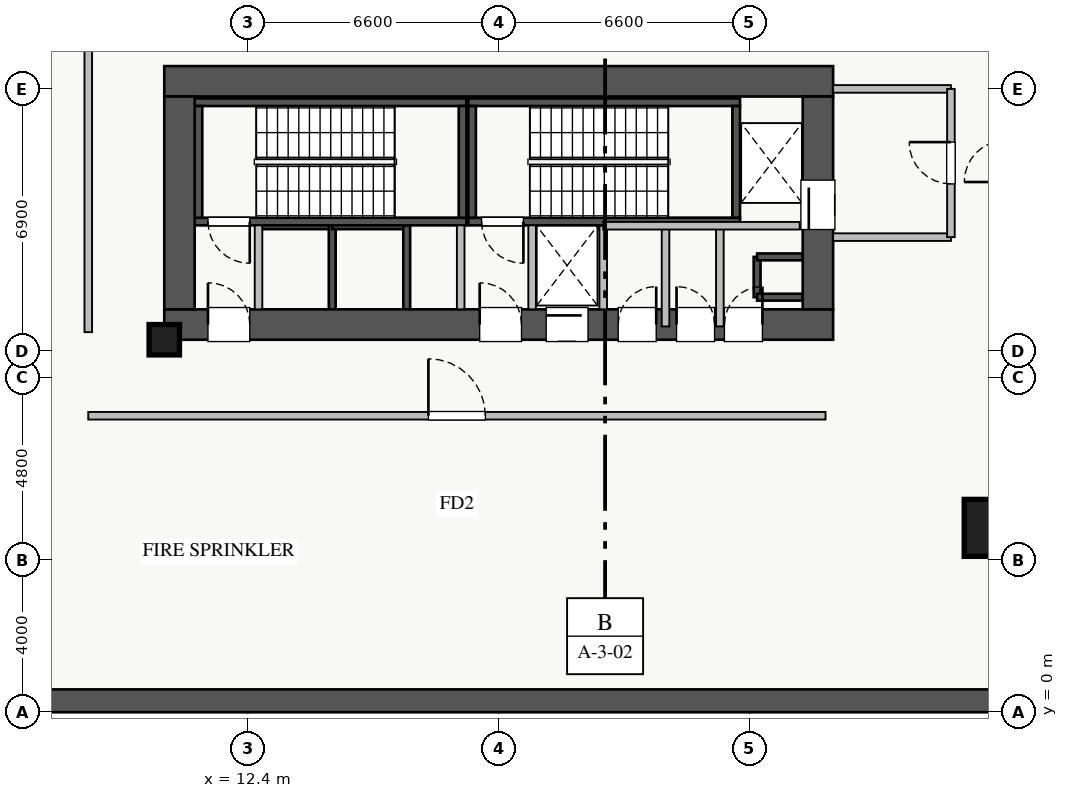
"""IFC4 building model, lengths in metres.
Left out: names, types, materials, properties, quantities, classifications, styles, units other than length and angle.
Written with IfcOpenShell. Run it as: python <this file> out.ifc"""

import sys

from ifc_helpers import new_model, si_unit, direction, frame, frame_2d, origin, origin_2d, place, context, subcontext, project, spatial, rectangle, extrude, source, transform, mapped, element, fill, save


model = new_model("IFC4")
c1 = context("Model", 3, precision=1e-05, world=origin(), true_north=direction((0.0, 1.0)))
c2 = subcontext(c1, "Body", "Model", "MODEL_VIEW")
j1 = project(units=[si_unit("LENGTHUNIT", "METRE"), si_unit("PLANEANGLEUNIT", "RADIAN")], contexts=[c1])
p1 = place(None, origin())
s1 = spatial("IfcSite", under=j1, at=p1, CompositionType="ELEMENT")
p2 = place(p1, origin())
s2 = spatial("IfcBuilding", under=s1, at=p2, CompositionType="ELEMENT")
p3 = place(p2, frame((0.0, 0.0, -9.6)))
s3 = spatial("IfcBuildingStorey", under=s2, at=p3, CompositionType="ELEMENT", Elevation=-9.6)
p4 = place(p3, frame((12.68, 12.8, 0.0), z_axis=(0.0, 0.0, 1.0), x_axis=(1.0, 0.0, 0.0)))
e1 = element("IfcWall", 1, at=p4, inside=s3, PredefinedType="SHEAR", context=c2, shape_type="SweptSolid", body=[
    extrude(rectangle(XDim=1.94, YDim=0.18, at=frame_2d((0.97, 0.0))), origin(), (0.0, 0.0, 1.0), 4.58),
])
p5 = place(p3, frame((14.62, 10.6, 0.0), z_axis=(0.0, 0.0, 1.0), x_axis=(0.0, 1.0, 0.0)))
e2 = element("IfcWall", 2, at=p5, inside=s3, PredefinedType="SHEAR", context=c2, shape_type="SweptSolid", body=[
    extrude(rectangle(XDim=2.2, YDim=0.18, at=frame_2d((1.1, 0.0))), origin(), (0.0, 0.0, 1.0), 4.58),
])
p6 = place(p3, frame((25.8, 10.92, 0.0), z_axis=(0.0, 0.0, 1.0), x_axis=(0.0, 1.0, 0.0)))
e3 = element("IfcWall", 3, at=p6, inside=s3, PredefinedType="SHEAR", context=c2, shape_type="SweptSolid", body=[
    extrude(rectangle(XDim=1.06, YDim=0.18, at=frame_2d((0.53, 0.0))), origin(), (0.0, 0.0, 1.0), 4.58),
])
for number, where, z_axis, x_axis in (
    (4, (25.8, 11.98, 0.0), (0.0, 0.0, 1.0), (1.0, 0.0, 0.0)),
    (5, (25.8, 10.92, 0.0), (0.0, 0.0, 1.0), (1.0, 0.0, 0.0)),
):
    element("IfcWall", number, at=place(p3, frame(where, z_axis=z_axis, x_axis=x_axis)), inside=s3, PredefinedType="SHEAR", context=c2, shape_type="SweptSolid", body=[
        extrude(rectangle(XDim=1.2, YDim=0.18, at=frame_2d((0.6, 0.0))), origin(), (0.0, 0.0, 1.0), 4.58),
    ])
p7 = place(p3, frame((14.62, 12.8, 0.0), z_axis=(0.0, 0.0, 1.0), x_axis=(1.0, 0.0, 0.0)))
e6 = element("IfcWall", 6, at=p7, inside=s3, PredefinedType="SHEAR", context=c2, shape_type="SweptSolid", body=[
    extrude(rectangle(XDim=1.96, YDim=0.18, at=frame_2d((0.98, 0.0))), origin(), (0.0, 0.0, 1.0), 4.58),
])
p8 = place(p3, frame((16.58, 10.6, 0.0), z_axis=(0.0, 0.0, 1.0), x_axis=(0.0, 1.0, 0.0)))
e7 = element("IfcWall", 7, at=p8, inside=s3, PredefinedType="SHEAR", context=c2, shape_type="SweptSolid", body=[
    extrude(rectangle(XDim=2.2, YDim=0.18, at=frame_2d((1.1, 0.0))), origin(), (0.0, 0.0, 1.0), 4.58),
])
p9 = place(p3, frame((19.88, 12.8, 0.0), z_axis=(0.0, 0.0, 1.0), x_axis=(1.0, 0.0, 0.0)))
e8 = element("IfcWall", 8, at=p9, inside=s3, PredefinedType="SHEAR", context=c2, shape_type="SweptSolid", body=[
    extrude(rectangle(XDim=1.87, YDim=0.18, at=frame_2d((0.935, 0.0))), origin(), (0.0, 0.0, 1.0), 4.58),
])
p10 = place(p3, frame((11.0, 12.91, 0.0), z_axis=(0.0, 0.0, 1.0), x_axis=(1.0, 0.0, 0.0)))
e9 = element("IfcWall", 9, at=p10, inside=s3, PredefinedType="SHEAR", context=c2, shape_type="SweptSolid", body=[
    extrude(rectangle(XDim=7.15, YDim=0.2, at=frame_2d((3.575, 0.0))), origin(), (0.0, 0.0, 1.0), 4.8),
])
p11 = place(p10, frame((0.35, 0.0, 0.0)))
e10 = element("IfcOpeningElement", 10, at=p11, cuts=e9, PredefinedType="OPENING", context=c2, shape_type="SweptSolid", body=[
    extrude(rectangle(XDim=1.1, YDim=2.05, at=frame_2d((0.55, 1.025))), frame((0.0, 0.11, 0.0), z_axis=(0.0, -1.0, 0.0), x_axis=(1.0, 0.0, 0.0)), (0.0, 0.0, 1.0), 0.22),
])
p12 = place(p3, frame((11.0, 16.05, 0.0), z_axis=(0.0, 0.0, 1.0), x_axis=(1.0, 0.0, 0.0)))
e11 = element("IfcWall", 11, at=p12, inside=s3, PredefinedType="SHEAR", context=c2, shape_type="SweptSolid", body=[
    extrude(rectangle(XDim=7.15, YDim=0.2, at=frame_2d((3.575, 0.0))), origin(), (0.0, 0.0, 1.0), 4.8),
])
for number, where, z_axis, x_axis in (
    (12, (11.1, 13.01, 0.0), (0.0, 0.0, 1.0), (0.0, 1.0, 0.0)),
    (13, (18.05, 13.01, 0.0), (0.0, 0.0, 1.0), (0.0, 1.0, 0.0)),
):
    element("IfcWall", number, at=place(p3, frame(where, z_axis=z_axis, x_axis=x_axis)), inside=s3, PredefinedType="SHEAR", context=c2, shape_type="SweptSolid", body=[
        extrude(rectangle(XDim=2.94, YDim=0.2, at=frame_2d((1.47, 0.0))), origin(), (0.0, 0.0, 1.0), 4.8),
    ])
p13 = place(p3, frame((18.2, 12.91, 0.0), z_axis=(0.0, 0.0, 1.0), x_axis=(1.0, 0.0, 0.0)))
e14 = element("IfcWall", 14, at=p13, inside=s3, PredefinedType="SHEAR", context=c2, shape_type="SweptSolid", body=[
    extrude(rectangle(XDim=7.15, YDim=0.2, at=frame_2d((3.575, 0.0))), origin(), (0.0, 0.0, 1.0), 4.8),
])
p14 = place(p13, frame((0.35, 0.0, 0.0)))
e15 = element("IfcOpeningElement", 15, at=p14, cuts=e14, PredefinedType="OPENING", context=c2, shape_type="SweptSolid", body=[
    extrude(rectangle(XDim=1.1, YDim=2.05, at=frame_2d((0.55, 1.025))), frame((0.0, 0.11, 0.0), z_axis=(0.0, -1.0, 0.0), x_axis=(1.0, 0.0, 0.0)), (0.0, 0.0, 1.0), 0.22),
])
p15 = place(p3, frame((18.2, 16.05, 0.0), z_axis=(0.0, 0.0, 1.0), x_axis=(1.0, 0.0, 0.0)))
e16 = element("IfcWall", 16, at=p15, inside=s3, PredefinedType="SHEAR", context=c2, shape_type="SweptSolid", body=[
    extrude(rectangle(XDim=7.15, YDim=0.2, at=frame_2d((3.575, 0.0))), origin(), (0.0, 0.0, 1.0), 4.8),
])
for number, where, z_axis, x_axis in (
    (17, (18.3, 13.01, 0.0), (0.0, 0.0, 1.0), (0.0, 1.0, 0.0)),
    (18, (25.25, 13.01, 0.0), (0.0, 0.0, 1.0), (0.0, 1.0, 0.0)),
):
    element("IfcWall", number, at=place(p3, frame(where, z_axis=z_axis, x_axis=x_axis)), inside=s3, PredefinedType="SHEAR", context=c2, shape_type="SweptSolid", body=[
        extrude(rectangle(XDim=2.94, YDim=0.2, at=frame_2d((1.47, 0.0))), origin(), (0.0, 0.0, 1.0), 4.8),
    ])
p16 = place(p3, frame((0.0, 0.3, 0.0), z_axis=(0.0, 0.0, 1.0), x_axis=(1.0, 0.0, 0.0)))
e19 = element("IfcWall", 19, at=p16, inside=s3, PredefinedType="SOLIDWALL", context=c2, shape_type="SweptSolid", body=[
    extrude(rectangle(XDim=74.0, YDim=0.6, at=frame_2d((37.0, 0.0))), origin(), (0.0, 0.0, 1.0), 4.8),
])
p17 = place(p3, frame((10.2, 10.2, 0.0), z_axis=(0.0, 0.0, 1.0), x_axis=(1.0, 0.0, 0.0)))
e20 = element("IfcWall", 20, at=p17, inside=s3, PredefinedType="SHEAR", context=c2, shape_type="SweptSolid", body=[
    extrude(rectangle(XDim=17.6, YDim=0.8, at=frame_2d((8.8, 0.0))), origin(), (0.0, 0.0, 1.0), 4.8),
])
p18 = place(p17, frame((1.15, 0.0, 0.0)))
e21 = element("IfcOpeningElement", 21, at=p18, cuts=e20, PredefinedType="OPENING", context=c2, shape_type="SweptSolid", body=[
    extrude(rectangle(XDim=1.1, YDim=2.05, at=frame_2d((0.55, 1.025))), frame((0.0, 0.41, 0.0), z_axis=(0.0, -1.0, 0.0), x_axis=(1.0, 0.0, 0.0)), (0.0, 0.0, 1.0), 0.82),
])
p19 = place(p17, frame((8.3, 0.0, 0.0)))
e22 = element("IfcOpeningElement", 22, at=p19, cuts=e20, PredefinedType="OPENING", context=c2, shape_type="SweptSolid", body=[
    extrude(rectangle(XDim=1.1, YDim=2.05, at=frame_2d((0.55, 1.025))), frame((0.0, 0.41, 0.0), z_axis=(0.0, -1.0, 0.0), x_axis=(1.0, 0.0, 0.0)), (0.0, 0.0, 1.0), 0.82),
])
p20 = place(p17, frame((10.05, 0.0, 0.0)))
e23 = element("IfcOpeningElement", 23, at=p20, cuts=e20, PredefinedType="OPENING", context=c2, shape_type="SweptSolid", body=[
    extrude(rectangle(XDim=1.1, YDim=2.05, at=frame_2d((0.55, 1.025))), frame((0.0, 0.41, 0.0), z_axis=(0.0, -1.0, 0.0), x_axis=(1.0, 0.0, 0.0)), (0.0, 0.0, 1.0), 0.82),
])
p21 = place(p17, frame((14.74, 0.0, 0.0)))
e24 = element("IfcOpeningElement", 24, at=p21, cuts=e20, PredefinedType="OPENING", context=c2, shape_type="SweptSolid", body=[
    extrude(rectangle(XDim=1.0, YDim=2.05, at=frame_2d((0.5, 1.025))), frame((0.0, 0.41, 0.0), z_axis=(0.0, -1.0, 0.0), x_axis=(1.0, 0.0, 0.0)), (0.0, 0.0, 1.0), 0.82),
])
p22 = place(p17, frame((11.945, 0.0, 0.0)))
e25 = element("IfcOpeningElement", 25, at=p22, cuts=e20, PredefinedType="OPENING", context=c2, shape_type="SweptSolid", body=[
    extrude(rectangle(XDim=1.0, YDim=2.05, at=frame_2d((0.5, 1.025))), frame((0.0, 0.41, 0.0), z_axis=(0.0, -1.0, 0.0), x_axis=(1.0, 0.0, 0.0)), (0.0, 0.0, 1.0), 0.82),
])
p23 = place(p17, frame((13.48, 0.0, 0.0)))
e26 = element("IfcOpeningElement", 26, at=p23, cuts=e20, PredefinedType="OPENING", context=c2, shape_type="SweptSolid", body=[
    extrude(rectangle(XDim=1.0, YDim=2.05, at=frame_2d((0.5, 1.025))), frame((0.0, 0.41, 0.0), z_axis=(0.0, -1.0, 0.0), x_axis=(1.0, 0.0, 0.0)), (0.0, 0.0, 1.0), 0.82),
])
p24 = place(p3, frame((10.2, 16.6, 0.0), z_axis=(0.0, 0.0, 1.0), x_axis=(1.0, 0.0, 0.0)))
e27 = element("IfcWall", 27, at=p24, inside=s3, PredefinedType="SHEAR", context=c2, shape_type="SweptSolid", body=[
    extrude(rectangle(XDim=17.6, YDim=0.8, at=frame_2d((8.8, 0.0))), origin(), (0.0, 0.0, 1.0), 4.8),
])
p25 = place(p3, frame((10.6, 10.6, 0.0), z_axis=(0.0, 0.0, 1.0), x_axis=(0.0, 1.0, 0.0)))
e28 = element("IfcWall", 28, at=p25, inside=s3, PredefinedType="SHEAR", context=c2, shape_type="SweptSolid", body=[
    extrude(rectangle(XDim=5.6, YDim=0.8, at=frame_2d((2.8, 0.0))), origin(), (0.0, 0.0, 1.0), 4.8),
])
p26 = place(p3, frame((27.4, 10.6, 0.0), z_axis=(0.0, 0.0, 1.0), x_axis=(0.0, 1.0, 0.0)))
e29 = element("IfcWall", 29, at=p26, inside=s3, PredefinedType="SHEAR", context=c2, shape_type="SweptSolid", body=[
    extrude(rectangle(XDim=5.6, YDim=0.8, at=frame_2d((2.8, 0.0))), origin(), (0.0, 0.0, 1.0), 4.8),
])
p27 = place(p26, frame((2.1, 0.0, 0.0)))
e30 = element("IfcOpeningElement", 30, at=p27, cuts=e29, PredefinedType="OPENING", context=c2, shape_type="SweptSolid", body=[
    extrude(rectangle(XDim=1.3, YDim=2.05, at=frame_2d((0.65, 1.025))), frame((0.0, 0.41, 0.0), z_axis=(0.0, -1.0, 0.0), x_axis=(1.0, 0.0, 0.0)), (0.0, 0.0, 1.0), 0.82),
])
m1 = source(origin(), c2, "Body", "SweptSolid", [
    extrude(rectangle(XDim=1.5, YDim=1.5, at=origin_2d()), origin(), (0.0, 0.0, 1.0), 4.8),
])
p28 = place(p3, frame((32.0, 4.85, 0.0), z_axis=(0.0, 0.0, 1.0), x_axis=(1.0, 0.0, 0.0)))
e31 = element("IfcColumn", 31, at=p28, inside=s3, PredefinedType="COLUMN", context=c2, shape_type="MappedRepresentation", body=[
    mapped(m1, transform((0.0, 0.0, 0.0), x_axis=(1.0, 0.0, 0.0), y_axis=(0.0, 1.0, 0.0), z_axis=(0.0, 0.0, 1.0), scale=1.0)),
])
m2 = source(origin(), c2, "Body", "SweptSolid", [
    extrude(rectangle(XDim=0.8, YDim=0.8, at=origin_2d()), origin(), (0.0, 0.0, 1.0), 4.8),
])
p29 = place(p3, frame((10.2, 9.8, 0.0), z_axis=(0.0, 0.0, 1.0), x_axis=(1.0, 0.0, 0.0)))
e32 = element("IfcColumn", 32, at=p29, inside=s3, PredefinedType="PILASTER", context=c2, shape_type="MappedRepresentation", body=[
    mapped(m2, transform((0.0, 0.0, 0.0), x_axis=(1.0, 0.0, 0.0), y_axis=(0.0, 1.0, 0.0), z_axis=(0.0, 0.0, 1.0), scale=1.0)),
])
p30 = place(p3, frame((27.8, 16.4, 0.0), z_axis=(0.0, 0.0, 1.0), x_axis=(1.0, 0.0, 0.0)))
e33 = element("IfcWall", 33, at=p30, inside=s3, PredefinedType="PARTITIONING", context=c2, shape_type="SweptSolid", body=[
    extrude(rectangle(XDim=3.1, YDim=0.2, at=frame_2d((1.55, 0.0))), origin(), (0.0, 0.0, 1.0), 3.875),
])
p31 = place(p3, frame((27.8, 12.5, 0.0), z_axis=(0.0, 0.0, 1.0), x_axis=(1.0, 0.0, 0.0)))
e34 = element("IfcWall", 34, at=p31, inside=s3, PredefinedType="PARTITIONING", context=c2, shape_type="SweptSolid", body=[
    extrude(rectangle(XDim=3.1, YDim=0.2, at=frame_2d((1.55, 0.0))), origin(), (0.0, 0.0, 1.0), 3.575),
])
p32 = place(p3, frame((30.9, 12.5, 0.0), z_axis=(0.0, 0.0, 1.0), x_axis=(0.0, 1.0, 0.0)))
e35 = element("IfcWall", 35, at=p32, inside=s3, PredefinedType="PARTITIONING", context=c2, shape_type="SweptSolid", body=[
    extrude(rectangle(XDim=3.9, YDim=0.2, at=frame_2d((1.95, 0.0))), origin(), (0.0, 0.0, 1.0), 4.58),
])
p33 = place(p32, frame((1.4, 0.0, 0.0)))
e36 = element("IfcOpeningElement", 36, at=p33, cuts=e35, PredefinedType="OPENING", context=c2, shape_type="SweptSolid", body=[
    extrude(rectangle(XDim=1.1, YDim=2.05, at=frame_2d((0.55, 1.025))), frame((0.0, 0.11, 0.0), z_axis=(0.0, -1.0, 0.0), x_axis=(1.0, 0.0, 0.0)), (0.0, 0.0, 1.0), 0.22),
])
for number, where, z_axis, x_axis in (
    (37, (12.68, 10.6, 0.0), (0.0, 0.0, 1.0), (0.0, 1.0, 0.0)),
    (38, (18.0, 10.6, 0.0), (0.0, 0.0, 1.0), (0.0, 1.0, 0.0)),
    (39, (19.88, 10.6, 0.0), (0.0, 0.0, 1.0), (0.0, 1.0, 0.0)),
):
    element("IfcWall", number, at=place(p3, frame(where, z_axis=z_axis, x_axis=x_axis)), inside=s3, PredefinedType="PARTITIONING", context=c2, shape_type="SweptSolid", body=[
        extrude(rectangle(XDim=2.21, YDim=0.2, at=frame_2d((1.105, 0.0))), origin(), (0.0, 0.0, 1.0), 4.58),
    ])
p34 = place(p3, frame((24.82, 10.15, 0.0), z_axis=(0.0, 0.0, 1.0), x_axis=(0.0, 1.0, 0.0)))
e40 = element("IfcWall", 40, at=p34, inside=s3, PredefinedType="PARTITIONING", context=c2, shape_type="SweptSolid", body=[
    extrude(rectangle(XDim=2.65, YDim=0.2, at=frame_2d((1.325, 0.0))), origin(), (0.0, 0.0, 1.0), 4.58),
])
p35 = place(p3, frame((21.75, 10.6, 0.0), z_axis=(0.0, 0.0, 1.0), x_axis=(0.0, 1.0, 0.0)))
e41 = element("IfcWall", 41, at=p35, inside=s3, PredefinedType="PARTITIONING", context=c2, shape_type="SweptSolid", body=[
    extrude(rectangle(XDim=2.2, YDim=0.2, at=frame_2d((1.1, 0.0))), origin(), (0.0, 0.0, 1.0), 4.58),
])
p36 = place(p3, frame((23.39, 10.15, 0.0), z_axis=(0.0, 0.0, 1.0), x_axis=(0.0, 1.0, 0.0)))
e42 = element("IfcWall", 42, at=p36, inside=s3, PredefinedType="PARTITIONING", context=c2, shape_type="SweptSolid", body=[
    extrude(rectangle(XDim=2.65, YDim=0.2, at=frame_2d((1.325, 0.0))), origin(), (0.0, 0.0, 1.0), 4.58),
])
p37 = place(p3, frame((21.75, 12.8, 0.0), z_axis=(0.0, 0.0, 1.0), x_axis=(1.0, 0.0, 0.0)))
e43 = element("IfcWall", 43, at=p37, inside=s3, PredefinedType="PARTITIONING", context=c2, shape_type="SweptSolid", body=[
    extrude(rectangle(XDim=5.17, YDim=0.2, at=frame_2d((2.585, 0.0))), origin(), (0.0, 0.0, 1.0), 4.58),
])
p38 = place(p3, frame((8.2, 10.0, 0.0), z_axis=(0.0, 0.0, 1.0), x_axis=(0.0, 1.0, 0.0)))
e44 = element("IfcWall", 44, at=p38, inside=s3, PredefinedType="PARTITIONING", context=c2, shape_type="SweptSolid", body=[
    extrude(rectangle(XDim=26.0, YDim=0.2, at=frame_2d((13.0, 0.0))), origin(), (0.0, 0.0, 1.0), 4.58),
])
p39 = place(p38, frame((12.25, 0.0, 0.0)))
e45 = element("IfcOpeningElement", 45, at=p39, cuts=e44, PredefinedType="OPENING", context=c2, shape_type="SweptSolid", body=[
    extrude(rectangle(XDim=1.5, YDim=2.05, at=frame_2d((0.75, 1.025))), frame((0.0, 0.11, 0.0), z_axis=(0.0, -1.0, 0.0), x_axis=(1.0, 0.0, 0.0)), (0.0, 0.0, 1.0), 0.22),
])
p40 = place(p3, frame((8.2, 7.8, 0.0), z_axis=(0.0, 0.0, 1.0), x_axis=(1.0, 0.0, 0.0)))
e46 = element("IfcWall", 46, at=p40, inside=s3, PredefinedType="PARTITIONING", context=c2, shape_type="SweptSolid", body=[
    extrude(rectangle(XDim=19.4, YDim=0.2, at=frame_2d((9.7, 0.0))), origin(), (0.0, 0.0, 1.0), 4.58),
])
p41 = place(p40, frame((8.95, 0.0, 0.0)))
e47 = element("IfcOpeningElement", 47, at=p41, cuts=e46, PredefinedType="OPENING", context=c2, shape_type="SweptSolid", body=[
    extrude(rectangle(XDim=1.5, YDim=2.05, at=frame_2d((0.75, 1.025))), frame((0.0, 0.11, 0.0), z_axis=(0.0, -1.0, 0.0), x_axis=(1.0, 0.0, 0.0)), (0.0, 0.0, 1.0), 0.22),
])
m3 = source(origin(), c2, "Body", "SweptSolid", [
    extrude(rectangle(XDim=1.3, YDim=2.05, at=frame_2d((0.65, 1.025))), frame((0.0, 0.025, 0.0), z_axis=(0.0, -1.0, 0.0), x_axis=(1.0, 0.0, 0.0)), (0.0, 0.0, 1.0), 0.05),
])
p42 = place(p27, origin())
e48 = element("IfcDoor", 48, at=p42, inside=s3, OperationType="SLIDING_TO_RIGHT", PredefinedType="DOOR", context=c2, shape_type="MappedRepresentation", body=[
    mapped(m3, transform((0.0, 0.0, 0.0), x_axis=(1.0, 0.0, 0.0), y_axis=(0.0, 1.0, 0.0), z_axis=(0.0, 0.0, 1.0), scale=1.0)),
])
fill(e30, e48)
m4 = source(origin(), c2, "Body", "SweptSolid", [
    extrude(rectangle(XDim=1.1, YDim=2.05, at=frame_2d((0.55, 1.025))), frame((0.0, 0.025, 0.0), z_axis=(0.0, -1.0, 0.0), x_axis=(1.0, 0.0, 0.0)), (0.0, 0.0, 1.0), 0.05),
])
p43 = place(p18, origin())
e49 = element("IfcDoor", 49, at=p43, inside=s3, OperationType="SINGLE_SWING_LEFT", PredefinedType="DOOR", context=c2, shape_type="MappedRepresentation", body=[
    mapped(m4, transform((0.0, 0.0, 0.0), x_axis=(1.0, 0.0, 0.0), y_axis=(0.0, 1.0, 0.0), z_axis=(0.0, 0.0, 1.0), scale=1.0)),
])
fill(e21, e49)
p44 = place(p11, frame((1.1, 0.0, 0.0), z_axis=(0.0, 0.0, 1.0), x_axis=(-1.0, 0.0, 0.0)))
e50 = element("IfcDoor", 50, at=p44, inside=s3, OperationType="SINGLE_SWING_RIGHT", PredefinedType="DOOR", context=c2, shape_type="MappedRepresentation", body=[
    mapped(m4, transform((0.0, 0.0, 0.0), x_axis=(1.0, 0.0, 0.0), y_axis=(0.0, 1.0, 0.0), z_axis=(0.0, 0.0, 1.0), scale=1.0)),
])
fill(e10, e50)
p45 = place(p19, origin())
e51 = element("IfcDoor", 51, at=p45, inside=s3, OperationType="SINGLE_SWING_LEFT", PredefinedType="DOOR", context=c2, shape_type="MappedRepresentation", body=[
    mapped(m4, transform((0.0, 0.0, 0.0), x_axis=(1.0, 0.0, 0.0), y_axis=(0.0, 1.0, 0.0), z_axis=(0.0, 0.0, 1.0), scale=1.0)),
])
fill(e22, e51)
p46 = place(p14, frame((1.1, 0.0, 0.0), z_axis=(0.0, 0.0, 1.0), x_axis=(-1.0, 0.0, 0.0)))
e52 = element("IfcDoor", 52, at=p46, inside=s3, OperationType="SINGLE_SWING_RIGHT", PredefinedType="DOOR", context=c2, shape_type="MappedRepresentation", body=[
    mapped(m4, transform((0.0, 0.0, 0.0), x_axis=(1.0, 0.0, 0.0), y_axis=(0.0, 1.0, 0.0), z_axis=(0.0, 0.0, 1.0), scale=1.0)),
])
fill(e15, e52)
p47 = place(p20, origin())
e53 = element("IfcDoor", 53, at=p47, inside=s3, OperationType="SLIDING_TO_RIGHT", PredefinedType="DOOR", context=c2, shape_type="MappedRepresentation", body=[
    mapped(m4, transform((0.0, 0.0, 0.0), x_axis=(1.0, 0.0, 0.0), y_axis=(0.0, 1.0, 0.0), z_axis=(0.0, 0.0, 1.0), scale=1.0)),
])
fill(e23, e53)
m5 = source(origin(), c2, "Body", "SweptSolid", [
    extrude(rectangle(XDim=1.0, YDim=2.05, at=frame_2d((0.5, 1.025))), frame((0.0, 0.025, 0.0), z_axis=(0.0, -1.0, 0.0), x_axis=(1.0, 0.0, 0.0)), (0.0, 0.0, 1.0), 0.05),
])
p48 = place(p21, origin())
e54 = element("IfcDoor", 54, at=p48, inside=s3, OperationType="SINGLE_SWING_RIGHT", PredefinedType="DOOR", context=c2, shape_type="MappedRepresentation", body=[
    mapped(m5, transform((0.0, 0.0, 0.0), x_axis=(1.0, 0.0, 0.0), y_axis=(0.0, 1.0, 0.0), z_axis=(0.0, 0.0, 1.0), scale=1.0)),
])
fill(e24, e54)
p49 = place(p22, origin())
e55 = element("IfcDoor", 55, at=p49, inside=s3, OperationType="SINGLE_SWING_RIGHT", PredefinedType="DOOR", context=c2, shape_type="MappedRepresentation", body=[
    mapped(m5, transform((0.0, 0.0, 0.0), x_axis=(1.0, 0.0, 0.0), y_axis=(0.0, 1.0, 0.0), z_axis=(0.0, 0.0, 1.0), scale=1.0)),
])
fill(e25, e55)
p50 = place(p23, origin())
e56 = element("IfcDoor", 56, at=p50, inside=s3, OperationType="SINGLE_SWING_LEFT", PredefinedType="DOOR", context=c2, shape_type="MappedRepresentation", body=[
    mapped(m5, transform((0.0, 0.0, 0.0), x_axis=(1.0, 0.0, 0.0), y_axis=(0.0, 1.0, 0.0), z_axis=(0.0, 0.0, 1.0), scale=1.0)),
])
fill(e26, e56)
p51 = place(p33, origin())
e57 = element("IfcDoor", 57, at=p51, inside=s3, OperationType="SINGLE_SWING_RIGHT", PredefinedType="DOOR", context=c2, shape_type="MappedRepresentation", body=[
    mapped(m4, transform((0.0, 0.0, 0.0), x_axis=(1.0, 0.0, 0.0), y_axis=(0.0, 1.0, 0.0), z_axis=(0.0, 0.0, 1.0), scale=1.0)),
])
fill(e36, e57)
m6 = source(origin(), c2, "Body", "SweptSolid", [
    extrude(rectangle(XDim=1.5, YDim=2.05, at=frame_2d((0.75, 1.025))), frame((0.0, 0.025, 0.0), z_axis=(0.0, -1.0, 0.0), x_axis=(1.0, 0.0, 0.0)), (0.0, 0.0, 1.0), 0.05),
])
p52 = place(p41, origin())
e58 = element("IfcDoor", 58, at=p52, inside=s3, OperationType="SINGLE_SWING_LEFT", PredefinedType="DOOR", context=c2, shape_type="MappedRepresentation", body=[
    mapped(m6, transform((0.0, 0.0, 0.0), x_axis=(1.0, 0.0, 0.0), y_axis=(0.0, 1.0, 0.0), z_axis=(0.0, 0.0, 1.0), scale=1.0)),
])
fill(e47, e58)
save(model, sys.argv[1])
